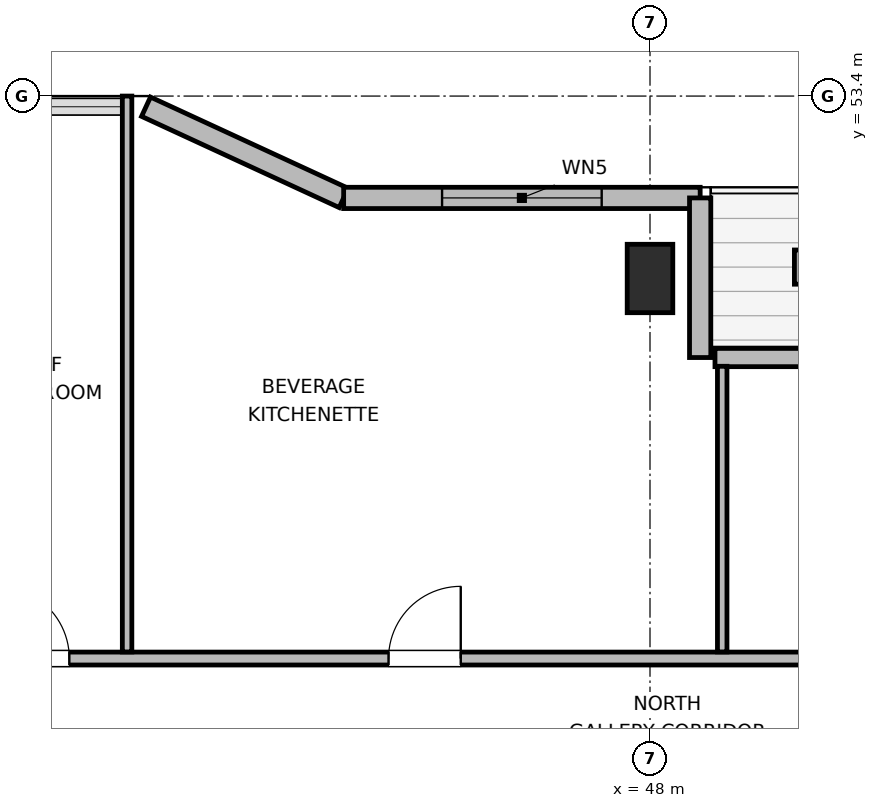
"""IFC4 building model, lengths in metres.
Left out: names, types, materials, properties, quantities, classifications, styles, units other than length and angle.
Written with IfcOpenShell. Run it as: python <this file> out.ifc"""

import sys

from ifc_helpers import new_model, si_unit, direction, frame, frame_2d, origin, origin_2d, place, context, subcontext, project, spatial, rectangle, extrude, element, fill, save


model = new_model("IFC4")
c1 = context("Model", 3, precision=1e-05, world=origin(), true_north=direction((0.0, 1.0)))
c2 = subcontext(c1, "Body", "Model", "MODEL_VIEW")
j1 = project(units=[si_unit("LENGTHUNIT", "METRE"), si_unit("PLANEANGLEUNIT", "RADIAN")], contexts=[c1])
p1 = place(None, origin())
s1 = spatial("IfcSite", under=j1, at=p1, CompositionType="ELEMENT")
p2 = place(p1, origin())
s2 = spatial("IfcBuilding", under=s1, at=p2, CompositionType="ELEMENT")
p3 = place(p2, frame((0.0, 0.0, 350.4)))
s3 = spatial("IfcBuildingStorey", under=s2, at=p3, CompositionType="ELEMENT", Elevation=350.4)
p4 = place(p3, frame((48.0, 51.0, 0.0), z_axis=(0.0, 0.0, 1.0), x_axis=(1.0, 0.0, 0.0)))
e1 = element("IfcColumn", 1, at=p4, inside=s3, PredefinedType="COLUMN", context=c2, shape_type="SweptSolid", body=[
    extrude(rectangle(XDim=0.6, YDim=0.9, at=origin_2d()), origin(), (0.0, 0.0, 1.0), 4.5),
])
p5 = place(p3, frame((41.369, 53.26, 0.0), z_axis=(0.0, 0.0, 1.0), x_axis=(0.907956889006, -0.419063584324, 0.0)))
e2 = element("IfcWall", 2, at=p5, inside=s3, PredefinedType="SOLIDWALL", context=c2, shape_type="SweptSolid", body=[
    extrude(rectangle(XDim=2.864, YDim=0.28, at=frame_2d((1.432, 0.0))), origin(), (0.0, 0.0, 1.0), 2.735),
])
p6 = place(p3, frame((43.969, 52.06, 0.0), z_axis=(0.0, 0.0, 1.0), x_axis=(1.0, 0.0, 0.0)))
e3 = element("IfcWall", 3, at=p6, inside=s3, PredefinedType="SOLIDWALL", context=c2, shape_type="SweptSolid", body=[
    extrude(rectangle(XDim=4.691, YDim=0.28, at=frame_2d((2.345, 0.0))), origin(), (0.0, 0.0, 1.0), 2.735),
])
p7 = place(p6, frame((1.295, 0.0, 0.85)))
e4 = element("IfcOpeningElement", 4, at=p7, cuts=e3, PredefinedType="OPENING", context=c2, shape_type="SweptSolid", body=[
    extrude(rectangle(XDim=2.1, YDim=1.05, at=frame_2d((1.05, 0.525))), frame((0.0, 0.15, 0.0), z_axis=(0.0, -1.0, 0.0), x_axis=(1.0, 0.0, 0.0)), (0.0, 0.0, 1.0), 0.3),
])
p8 = place(p3, frame((48.66, 52.06, 0.0), z_axis=(0.0, 0.0, 1.0), x_axis=(0.0, -1.0, 0.0)))
e5 = element("IfcWall", 5, at=p8, inside=s3, PredefinedType="SOLIDWALL", context=c2, shape_type="SweptSolid", body=[
    extrude(rectangle(XDim=2.1, YDim=0.28, at=frame_2d((1.05, 0.0))), origin(), (0.0, 0.0, 1.0), 2.735),
])
p9 = place(p3, frame((48.855, 49.96, 0.0), z_axis=(0.0, 0.0, 1.0), x_axis=(1.0, 0.0, 0.0)))
e6 = element("IfcWall", 6, at=p9, inside=s3, PredefinedType="SOLIDWALL", context=c2, shape_type="SweptSolid", body=[
    extrude(rectangle(XDim=4.49, YDim=0.24, at=frame_2d((2.245, 0.0))), origin(), (0.0, 0.0, 1.0), 2.735),
])
p10 = place(p9, frame((1.745, 0.0, 0.0)))
e7 = element("IfcOpeningElement", 7, at=p10, cuts=e6, PredefinedType="OPENING", context=c2, shape_type="SweptSolid", body=[
    extrude(rectangle(XDim=1.0, YDim=2.02, at=frame_2d((0.5, 1.01))), frame((0.0, 0.13, 0.0), z_axis=(0.0, -1.0, 0.0), x_axis=(1.0, 0.0, 0.0)), (0.0, 0.0, 1.0), 0.26),
])
p11 = place(p3, frame((30.725, 46.0, 0.0), z_axis=(0.0, 0.0, 1.0), x_axis=(1.0, 0.0, 0.0)))
e8 = element("IfcWall", 8, at=p11, inside=s3, PredefinedType="PARTITIONING", context=c2, shape_type="SweptSolid", body=[
    extrude(rectangle(XDim=32.875, YDim=0.17, at=frame_2d((16.438, 0.0))), origin(), (0.0, 0.0, 1.0), 4.2),
])
p12 = place(p11, frame((3.487, 0.0, 0.0)))
e9 = element("IfcOpeningElement", 9, at=p12, cuts=e8, PredefinedType="OPENING", context=c2, shape_type="SweptSolid", body=[
    extrude(rectangle(XDim=0.95, YDim=2.04, at=frame_2d((0.475, 1.02))), frame((0.0, 0.095, 0.0), z_axis=(0.0, -1.0, 0.0), x_axis=(1.0, 0.0, 0.0)), (0.0, 0.0, 1.0), 0.19),
])
p13 = place(p11, frame((8.685, 0.0, 0.0)))
e10 = element("IfcOpeningElement", 10, at=p13, cuts=e8, PredefinedType="OPENING", context=c2, shape_type="SweptSolid", body=[
    extrude(rectangle(XDim=0.95, YDim=2.04, at=frame_2d((0.475, 1.02))), frame((0.0, 0.095, 0.0), z_axis=(0.0, -1.0, 0.0), x_axis=(1.0, 0.0, 0.0)), (0.0, 0.0, 1.0), 0.19),
])
p14 = place(p11, frame((13.835, 0.0, 0.0)))
e11 = element("IfcOpeningElement", 11, at=p14, cuts=e8, PredefinedType="OPENING", context=c2, shape_type="SweptSolid", body=[
    extrude(rectangle(XDim=0.95, YDim=2.04, at=frame_2d((0.475, 1.02))), frame((0.0, 0.095, 0.0), z_axis=(0.0, -1.0, 0.0), x_axis=(1.0, 0.0, 0.0)), (0.0, 0.0, 1.0), 0.19),
])
p15 = place(p11, frame((20.22, 0.0, 0.0)))
e12 = element("IfcOpeningElement", 12, at=p15, cuts=e8, PredefinedType="OPENING", context=c2, shape_type="SweptSolid", body=[
    extrude(rectangle(XDim=0.95, YDim=2.04, at=frame_2d((0.475, 1.02))), frame((0.0, 0.095, 0.0), z_axis=(0.0, -1.0, 0.0), x_axis=(1.0, 0.0, 0.0)), (0.0, 0.0, 1.0), 0.19),
])
p16 = place(p11, frame((25.71, 0.0, 0.0)))
e13 = element("IfcOpeningElement", 13, at=p16, cuts=e8, PredefinedType="OPENING", context=c2, shape_type="SweptSolid", body=[
    extrude(rectangle(XDim=0.95, YDim=2.04, at=frame_2d((0.475, 1.02))), frame((0.0, 0.095, 0.0), z_axis=(0.0, -1.0, 0.0), x_axis=(1.0, 0.0, 0.0)), (0.0, 0.0, 1.0), 0.19),
])
p17 = place(p11, frame((30.565, 0.0, 0.0)))
e14 = element("IfcOpeningElement", 14, at=p17, cuts=e8, PredefinedType="OPENING", context=c2, shape_type="SweptSolid", body=[
    extrude(rectangle(XDim=0.95, YDim=2.04, at=frame_2d((0.475, 1.02))), frame((0.0, 0.095, 0.0), z_axis=(0.0, -1.0, 0.0), x_axis=(1.0, 0.0, 0.0)), (0.0, 0.0, 1.0), 0.19),
])
p18 = place(p3, frame((41.12, 46.087, 0.0), z_axis=(0.0, 0.0, 1.0), x_axis=(0.0, 1.0, 0.0)))
e15 = element("IfcWall", 15, at=p18, inside=s3, PredefinedType="PARTITIONING", context=c2, shape_type="SweptSolid", body=[
    extrude(rectangle(XDim=7.313, YDim=0.125, at=frame_2d((3.656, 0.0))), origin(), (0.0, 0.0, 1.0), 3.523),
])
p19 = place(p3, frame((48.95, 46.087, 0.0), z_axis=(0.0, 0.0, 1.0), x_axis=(0.0, 1.0, 0.0)))
e16 = element("IfcWall", 16, at=p19, inside=s3, PredefinedType="PARTITIONING", context=c2, shape_type="SweptSolid", body=[
    extrude(rectangle(XDim=3.758, YDim=0.125, at=frame_2d((1.879, 0.0))), origin(), (0.0, 0.0, 1.0), 4.2),
])
p20 = place(p7, origin())
e17 = element("IfcWindow", 17, at=p20, inside=s3, PartitioningType="SINGLE_PANEL", PredefinedType="WINDOW", context=c2, shape_type="SweptSolid", body=[
    extrude(rectangle(XDim=2.1, YDim=1.05, at=frame_2d((1.05, 0.525))), frame((0.0, 0.03, 0.0), z_axis=(0.0, -1.0, 0.0), x_axis=(1.0, 0.0, 0.0)), (0.0, 0.0, 1.0), 0.06),
])
fill(e4, e17)
p21 = place(p13, origin())
e18 = element("IfcDoor", 18, at=p21, inside=s3, OperationType="SINGLE_SWING_LEFT", PredefinedType="DOOR", context=c2, shape_type="SweptSolid", body=[
    extrude(rectangle(XDim=0.95, YDim=2.04, at=frame_2d((0.475, 1.02))), frame((0.0, 0.025, 0.0), z_axis=(0.0, -1.0, 0.0), x_axis=(1.0, 0.0, 0.0)), (0.0, 0.0, 1.0), 0.05),
])
fill(e10, e18)
p22 = place(p14, origin())
e19 = element("IfcDoor", 19, at=p22, inside=s3, OperationType="SINGLE_SWING_RIGHT", PredefinedType="DOOR", context=c2, shape_type="SweptSolid", body=[
    extrude(rectangle(XDim=0.95, YDim=2.04, at=frame_2d((0.475, 1.02))), frame((0.0, 0.025, 0.0), z_axis=(0.0, -1.0, 0.0), x_axis=(1.0, 0.0, 0.0)), (0.0, 0.0, 1.0), 0.05),
])
fill(e11, e19)
save(model, sys.argv[1])
